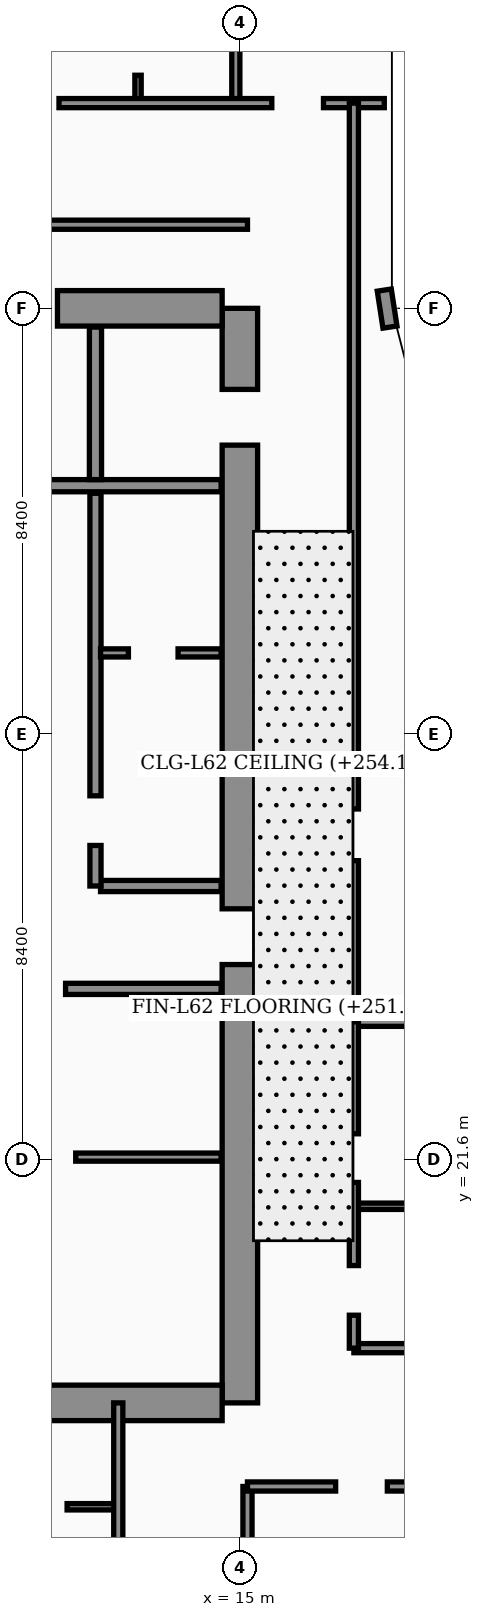
"""IFC4 building model, lengths in metres.
Left out: names, types, materials, properties, quantities, classifications, styles, units other than length and angle.
Written with IfcOpenShell. Run it as: python <this file> out.ifc"""

import sys

from ifc_helpers import new_model, si_unit, direction, frame, frame_2d, origin, place, context, subcontext, project, spatial, rectangle, extrude, element, fill, save


model = new_model("IFC4")
c1 = context("Model", 3, precision=1e-05, world=origin(), true_north=direction((0.0, 1.0)))
c2 = subcontext(c1, "Body", "Model", "MODEL_VIEW")
j1 = project(units=[si_unit("LENGTHUNIT", "METRE"), si_unit("PLANEANGLEUNIT", "RADIAN")], contexts=[c1])
p1 = place(None, origin())
s1 = spatial("IfcSite", under=j1, at=p1, CompositionType="ELEMENT")
p2 = place(p1, origin())
s2 = spatial("IfcBuilding", under=s1, at=p2, CompositionType="ELEMENT")
p3 = place(p2, frame((0.0, 0.0, 251.4)))
s3 = spatial("IfcBuildingStorey", under=s2, at=p3, CompositionType="ELEMENT", Elevation=251.4)
p4 = place(p3, frame((15.0, 16.8, 0.0), z_axis=(0.0, 0.0, 1.0), x_axis=(0.0, 1.0, 0.0)))
e1 = element("IfcWall", 1, at=p4, inside=s3, PredefinedType="SHEAR", context=c2, shape_type="SweptSolid", body=[
    extrude(rectangle(XDim=21.6, YDim=0.7, at=frame_2d((10.8, 0.0))), origin(), (0.0, 0.0, 1.0), 3.56),
])
p5 = place(p4, frame((8.65, 0.0, 0.0)))
e2 = element("IfcOpeningElement", 2, at=p5, cuts=e1, PredefinedType="OPENING", context=c2, shape_type="SweptSolid", body=[
    extrude(rectangle(XDim=1.1, YDim=2.2, at=frame_2d((0.55, 1.1))), frame((0.0, 0.36, 0.0), z_axis=(0.0, -1.0, 0.0), x_axis=(1.0, 0.0, 0.0)), (0.0, 0.0, 1.0), 0.72),
])
p6 = place(p4, frame((18.9, 0.0, 0.0)))
e3 = element("IfcOpeningElement", 3, at=p6, cuts=e1, PredefinedType="OPENING", context=c2, shape_type="SweptSolid", body=[
    extrude(rectangle(XDim=1.1, YDim=2.2, at=frame_2d((0.55, 1.1))), frame((0.0, 0.36, 0.0), z_axis=(0.0, -1.0, 0.0), x_axis=(1.0, 0.0, 0.0)), (0.0, 0.0, 1.0), 0.72),
])
p7 = place(p3, frame((4.55, 38.4, 0.0), z_axis=(0.0, 0.0, 1.0), x_axis=(1.0, 0.0, 0.0)))
e4 = element("IfcWall", 4, at=p7, inside=s3, PredefinedType="SHEAR", context=c2, shape_type="SweptSolid", body=[
    extrude(rectangle(XDim=10.1, YDim=0.7, at=frame_2d((5.05, 0.0))), origin(), (0.0, 0.0, 1.0), 3.56),
])
p8 = place(p7, frame((5.75, 0.0, 0.0)))
e5 = element("IfcOpeningElement", 5, at=p8, cuts=e4, PredefinedType="OPENING", context=c2, shape_type="SweptSolid", body=[
    extrude(rectangle(XDim=1.1, YDim=2.2, at=frame_2d((0.55, 1.1))), frame((0.0, 0.36, 0.0), z_axis=(0.0, -1.0, 0.0), x_axis=(1.0, 0.0, 0.0)), (0.0, 0.0, 1.0), 0.72),
])
p9 = place(p3, frame((4.55, 16.8, 0.0), z_axis=(0.0, 0.0, 1.0), x_axis=(1.0, 0.0, 0.0)))
e6 = element("IfcWall", 6, at=p9, inside=s3, PredefinedType="SHEAR", context=c2, shape_type="SweptSolid", body=[
    extrude(rectangle(XDim=10.1, YDim=0.7, at=frame_2d((5.05, 0.0))), origin(), (0.0, 0.0, 1.0), 3.56),
])
p10 = place(p3, frame((17.962, 38.03, 0.0), z_axis=(0.0, 0.0, 1.0), x_axis=(-0.15141125477, 0.988470855377, 0.0)))
e7 = element("IfcWall", 7, at=p10, inside=s3, PredefinedType="SOLIDWALL", context=c2, shape_type="SweptSolid", body=[
    extrude(rectangle(XDim=0.739, YDim=0.28, at=frame_2d((0.369, 0.0))), origin(), (0.0, 0.0, 1.0), 3.56),
])
p11 = place(p3, frame((9.68, 21.65, 0.0), z_axis=(0.0, 0.0, 1.0), x_axis=(1.0, 0.0, 0.0)))
e8 = element("IfcWall", 8, at=p11, inside=s3, PredefinedType="PARTITIONING", context=c2, shape_type="SweptSolid", body=[
    extrude(rectangle(XDim=4.95, YDim=0.16, at=frame_2d((2.475, 0.0))), origin(), (0.0, 0.0, 1.0), 3.09),
])
p12 = place(p11, frame((1.1, 0.0, 0.0)))
e9 = element("IfcOpeningElement", 9, at=p12, cuts=e8, PredefinedType="OPENING", context=c2, shape_type="SweptSolid", body=[
    extrude(rectangle(XDim=0.98, YDim=2.15, at=frame_2d((0.49, 1.075))), frame((0.0, 0.09, 0.0), z_axis=(0.0, -1.0, 0.0), x_axis=(1.0, 0.0, 0.0)), (0.0, 0.0, 1.0), 0.18),
])
p13 = place(p3, frame((9.68, 24.97, 0.0), z_axis=(0.0, 0.0, 1.0), x_axis=(1.0, 0.0, 0.0)))
e10 = element("IfcWall", 10, at=p13, inside=s3, PredefinedType="SOLIDWALL", context=c2, shape_type="SweptSolid", body=[
    extrude(rectangle(XDim=4.95, YDim=0.22, at=frame_2d((2.475, 0.0))), origin(), (0.0, 0.0, 1.0), 2.99),
])
p14 = place(p13, frame((0.9, 0.0, 0.0)))
e11 = element("IfcOpeningElement", 11, at=p14, cuts=e10, PredefinedType="OPENING", context=c2, shape_type="SweptSolid", body=[
    extrude(rectangle(XDim=0.98, YDim=2.15, at=frame_2d((0.49, 1.075))), frame((0.0, 0.12, 0.0), z_axis=(0.0, -1.0, 0.0), x_axis=(1.0, 0.0, 0.0)), (0.0, 0.0, 1.0), 0.24),
])
p15 = place(p3, frame((12.25, 27.0, 0.0), z_axis=(0.0, 0.0, 1.0), x_axis=(1.0, 0.0, 0.0)))
e12 = element("IfcWall", 12, at=p15, inside=s3, PredefinedType="SOLIDWALL", context=c2, shape_type="SweptSolid", body=[
    extrude(rectangle(XDim=2.38, YDim=0.22, at=frame_2d((1.19, 0.0))), origin(), (0.0, 0.0, 1.0), 3.56),
])
p16 = place(p3, frame((12.15, 27.0, 0.0), z_axis=(0.0, 0.0, 1.0), x_axis=(0.0, 1.0, 0.0)))
e13 = element("IfcWall", 13, at=p16, inside=s3, PredefinedType="SOLIDWALL", context=c2, shape_type="SweptSolid", body=[
    extrude(rectangle(XDim=7.75, YDim=0.22, at=frame_2d((3.875, 0.0))), origin(), (0.0, 0.0, 1.0), 3.56),
])
p17 = place(p16, frame((0.8, 0.0, 0.0)))
e14 = element("IfcOpeningElement", 14, at=p17, cuts=e13, PredefinedType="OPENING", context=c2, shape_type="SweptSolid", body=[
    extrude(rectangle(XDim=0.98, YDim=2.15, at=frame_2d((0.49, 1.075))), frame((0.0, 0.12, 0.0), z_axis=(0.0, -1.0, 0.0), x_axis=(1.0, 0.0, 0.0)), (0.0, 0.0, 1.0), 0.24),
])
p18 = place(p3, frame((12.25, 31.6, 0.0), z_axis=(0.0, 0.0, 1.0), x_axis=(1.0, 0.0, 0.0)))
e15 = element("IfcWall", 15, at=p18, inside=s3, PredefinedType="PARTITIONING", context=c2, shape_type="SweptSolid", body=[
    extrude(rectangle(XDim=2.38, YDim=0.16, at=frame_2d((1.19, 0.0))), origin(), (0.0, 0.0, 1.0), 3.14),
])
p19 = place(p18, frame((0.55, 0.0, 0.0)))
e16 = element("IfcOpeningElement", 16, at=p19, cuts=e15, PredefinedType="OPENING", context=c2, shape_type="SweptSolid", body=[
    extrude(rectangle(XDim=0.98, YDim=2.15, at=frame_2d((0.49, 1.075))), frame((0.0, 0.09, 0.0), z_axis=(0.0, -1.0, 0.0), x_axis=(1.0, 0.0, 0.0)), (0.0, 0.0, 1.0), 0.18),
])
p20 = place(p3, frame((9.66, 34.9, 0.0), z_axis=(0.0, 0.0, 1.0), x_axis=(1.0, 0.0, 0.0)))
e17 = element("IfcWall", 17, at=p20, inside=s3, PredefinedType="SOLIDWALL", context=c2, shape_type="SweptSolid", body=[
    extrude(rectangle(XDim=4.97, YDim=0.24, at=frame_2d((2.485, 0.0))), origin(), (0.0, 0.0, 1.0), 3.56),
])
p21 = place(p3, frame((12.15, 35.02, 0.0), z_axis=(0.0, 0.0, 1.0), x_axis=(0.0, 1.0, 0.0)))
e18 = element("IfcWall", 18, at=p21, inside=s3, PredefinedType="SOLIDWALL", context=c2, shape_type="SweptSolid", body=[
    extrude(rectangle(XDim=3.01, YDim=0.24, at=frame_2d((1.505, 0.0))), origin(), (0.0, 0.0, 1.0), 3.56),
])
p22 = place(p3, frame((0.08, 14.75, 0.0), z_axis=(0.0, 0.0, 1.0), x_axis=(1.0, 0.0, 0.0)))
e19 = element("IfcWall", 19, at=p22, inside=s3, PredefinedType="PARTITIONING", context=c2, shape_type="SweptSolid", body=[
    extrude(rectangle(XDim=12.52, YDim=0.125, at=frame_2d((6.26, 0.0))), origin(), (0.0, 0.0, 1.0), 2.99),
])
p23 = place(p22, frame((4.32, 0.0, 0.0)))
e20 = element("IfcOpeningElement", 20, at=p23, cuts=e19, PredefinedType="OPENING", context=c2, shape_type="SweptSolid", body=[
    extrude(rectangle(XDim=0.96, YDim=2.2, at=frame_2d((0.48, 1.1))), frame((0.0, 0.073, 0.0), z_axis=(0.0, -1.0, 0.0), x_axis=(1.0, 0.0, 0.0)), (0.0, 0.0, 1.0), 0.145),
])
p24 = place(p22, frame((10.61, 0.0, 0.0)))
e21 = element("IfcOpeningElement", 21, at=p24, cuts=e19, PredefinedType="OPENING", context=c2, shape_type="SweptSolid", body=[
    extrude(rectangle(XDim=0.9, YDim=2.15, at=frame_2d((0.45, 1.075))), frame((0.0, 0.073, 0.0), z_axis=(0.0, -1.0, 0.0), x_axis=(1.0, 0.0, 0.0)), (0.0, 0.0, 1.0), 0.145),
])
p25 = place(p3, frame((12.6, 2.44, 0.0), z_axis=(0.0, 0.0, 1.0), x_axis=(0.0, 1.0, 0.0)))
e22 = element("IfcWall", 22, at=p25, inside=s3, PredefinedType="PARTITIONING", context=c2, shape_type="SweptSolid", body=[
    extrude(rectangle(XDim=14.36, YDim=0.18, at=frame_2d((7.18, 0.0))), origin(), (0.0, 0.0, 1.0), 2.99),
])
p26 = place(p25, frame((3.01, 0.0, 0.0)))
e23 = element("IfcOpeningElement", 23, at=p26, cuts=e22, PredefinedType="OPENING", context=c2, shape_type="SweptSolid", body=[
    extrude(rectangle(XDim=1.02, YDim=2.2, at=frame_2d((0.51, 1.1))), frame((0.0, 0.1, 0.0), z_axis=(0.0, -1.0, 0.0), x_axis=(1.0, 0.0, 0.0)), (0.0, 0.0, 1.0), 0.2),
])
p27 = place(p25, frame((9.52, 0.0, 0.0)))
e24 = element("IfcOpeningElement", 24, at=p27, cuts=e22, PredefinedType="OPENING", context=c2, shape_type="SweptSolid", body=[
    extrude(rectangle(XDim=1.02, YDim=2.2, at=frame_2d((0.51, 1.1))), frame((0.0, 0.1, 0.0), z_axis=(0.0, -1.0, 0.0), x_axis=(1.0, 0.0, 0.0)), (0.0, 0.0, 1.0), 0.2),
])
p28 = place(p3, frame((15.15, 2.44, 0.0), z_axis=(0.0, 0.0, 1.0), x_axis=(0.0, 1.0, 0.0)))
e25 = element("IfcWall", 25, at=p28, inside=s3, PredefinedType="PARTITIONING", context=c2, shape_type="SweptSolid", body=[
    extrude(rectangle(XDim=12.71, YDim=0.18, at=frame_2d((6.355, 0.0))), origin(), (0.0, 0.0, 1.0), 3.09),
])
p29 = place(p3, frame((15.15, 15.15, 0.0), z_axis=(0.0, 0.0, 1.0), x_axis=(1.0, 0.0, 0.0)))
e26 = element("IfcWall", 26, at=p29, inside=s3, PredefinedType="PARTITIONING", context=c2, shape_type="SweptSolid", body=[
    extrude(rectangle(XDim=6.45, YDim=0.18, at=frame_2d((3.225, 0.0))), origin(), (0.0, 0.0, 1.0), 2.59),
])
p30 = place(p29, frame((1.74, 0.0, 0.0)))
e27 = element("IfcOpeningElement", 27, at=p30, cuts=e26, PredefinedType="OPENING", context=c2, shape_type="SweptSolid", body=[
    extrude(rectangle(XDim=1.02, YDim=2.2, at=frame_2d((0.51, 1.1))), frame((0.0, 0.1, 0.0), z_axis=(0.0, -1.0, 0.0), x_axis=(1.0, 0.0, 0.0)), (0.0, 0.0, 1.0), 0.2),
])
p31 = place(p3, frame((14.92, 42.45, 0.0), z_axis=(0.0, 0.0, 1.0), x_axis=(0.0, 1.0, 0.0)))
e28 = element("IfcWall", 28, at=p31, inside=s3, PredefinedType="PARTITIONING", context=c2, shape_type="SweptSolid", body=[
    extrude(rectangle(XDim=5.35, YDim=0.16, at=frame_2d((2.675, 0.0))), origin(), (0.0, 0.0, 1.0), 3.09),
])
p32 = place(p3, frame((12.99, 42.45, 0.0), z_axis=(0.0, 0.0, 1.0), x_axis=(0.0, 1.0, 0.0)))
e29 = element("IfcWall", 29, at=p32, inside=s3, PredefinedType="PARTITIONING", context=c2, shape_type="SweptSolid", body=[
    extrude(rectangle(XDim=8.49, YDim=0.125, at=frame_2d((4.245, 0.0))), origin(), (0.0, 0.0, 1.0), 3.09),
])
p33 = place(p32, frame((0.55, 0.0, 0.0)))
e30 = element("IfcOpeningElement", 30, at=p33, cuts=e29, PredefinedType="OPENING", context=c2, shape_type="SweptSolid", body=[
    extrude(rectangle(XDim=0.9, YDim=2.15, at=frame_2d((0.45, 1.075))), frame((0.0, 0.073, 0.0), z_axis=(0.0, -1.0, 0.0), x_axis=(1.0, 0.0, 0.0)), (0.0, 0.0, 1.0), 0.145),
])
p34 = place(p32, frame((4.72, 0.0, 0.0)))
e31 = element("IfcOpeningElement", 31, at=p34, cuts=e29, PredefinedType="OPENING", context=c2, shape_type="SweptSolid", body=[
    extrude(rectangle(XDim=0.96, YDim=2.2, at=frame_2d((0.48, 1.1))), frame((0.0, 0.073, 0.0), z_axis=(0.0, -1.0, 0.0), x_axis=(1.0, 0.0, 0.0)), (0.0, 0.0, 1.0), 0.145),
])
p35 = place(p3, frame((0.08, 42.45, 0.0), z_axis=(0.0, 0.0, 1.0), x_axis=(1.0, 0.0, 0.0)))
e32 = element("IfcWall", 32, at=p35, inside=s3, PredefinedType="PARTITIONING", context=c2, shape_type="SweptSolid", body=[
    extrude(rectangle(XDim=17.77, YDim=0.18, at=frame_2d((8.885, 0.0))), origin(), (0.0, 0.0, 1.0), 2.99),
])
p36 = place(p35, frame((0.9, 0.0, 0.0)))
e33 = element("IfcOpeningElement", 33, at=p36, cuts=e32, PredefinedType="OPENING", context=c2, shape_type="SweptSolid", body=[
    extrude(rectangle(XDim=1.02, YDim=2.2, at=frame_2d((0.51, 1.1))), frame((0.0, 0.1, 0.0), z_axis=(0.0, -1.0, 0.0), x_axis=(1.0, 0.0, 0.0)), (0.0, 0.0, 1.0), 0.2),
])
p37 = place(p35, frame((4.45, 0.0, 0.0)))
e34 = element("IfcOpeningElement", 34, at=p37, cuts=e32, PredefinedType="OPENING", context=c2, shape_type="SweptSolid", body=[
    extrude(rectangle(XDim=1.02, YDim=2.2, at=frame_2d((0.51, 1.1))), frame((0.0, 0.1, 0.0), z_axis=(0.0, -1.0, 0.0), x_axis=(1.0, 0.0, 0.0)), (0.0, 0.0, 1.0), 0.2),
])
p38 = place(p35, frame((10.33, 0.0, 0.0)))
e35 = element("IfcOpeningElement", 35, at=p38, cuts=e32, PredefinedType="OPENING", context=c2, shape_type="SweptSolid", body=[
    extrude(rectangle(XDim=1.02, YDim=2.2, at=frame_2d((0.51, 1.1))), frame((0.0, 0.1, 0.0), z_axis=(0.0, -1.0, 0.0), x_axis=(1.0, 0.0, 0.0)), (0.0, 0.0, 1.0), 0.2),
])
p39 = place(p35, frame((15.55, 0.0, 0.0)))
e36 = element("IfcOpeningElement", 36, at=p39, cuts=e32, PredefinedType="OPENING", context=c2, shape_type="SweptSolid", body=[
    extrude(rectangle(XDim=1.02, YDim=2.2, at=frame_2d((0.51, 1.1))), frame((0.0, 0.1, 0.0), z_axis=(0.0, -1.0, 0.0), x_axis=(1.0, 0.0, 0.0)), (0.0, 0.0, 1.0), 0.2),
])
p40 = place(p3, frame((17.25, 24.3, 0.0), z_axis=(0.0, 0.0, 1.0), x_axis=(0.0, 1.0, 0.0)))
e37 = element("IfcWall", 37, at=p40, inside=s3, PredefinedType="PARTITIONING", context=c2, shape_type="SweptSolid", body=[
    extrude(rectangle(XDim=18.15, YDim=0.18, at=frame_2d((9.075, 0.0))), origin(), (0.0, 0.0, 1.0), 2.99),
])
p41 = place(p40, frame((3.2, 0.0, 0.0)))
e38 = element("IfcOpeningElement", 38, at=p41, cuts=e37, PredefinedType="OPENING", context=c2, shape_type="SweptSolid", body=[
    extrude(rectangle(XDim=1.02, YDim=2.2, at=frame_2d((0.51, 1.1))), frame((0.0, 0.1, 0.0), z_axis=(0.0, -1.0, 0.0), x_axis=(1.0, 0.0, 0.0)), (0.0, 0.0, 1.0), 0.2),
])
p42 = place(p3, frame((3.83, 40.05, 0.0), z_axis=(0.0, 0.0, 1.0), x_axis=(1.0, 0.0, 0.0)))
e39 = element("IfcWall", 39, at=p42, inside=s3, PredefinedType="PARTITIONING", context=c2, shape_type="SweptSolid", body=[
    extrude(rectangle(XDim=11.32, YDim=0.18, at=frame_2d((5.66, 0.0))), origin(), (0.0, 0.0, 1.0), 2.99),
])
p43 = place(p3, frame((17.25, 17.88, 0.0), z_axis=(0.0, 0.0, 1.0), x_axis=(1.0, 0.0, 0.0)))
e40 = element("IfcWall", 40, at=p43, inside=s3, PredefinedType="PARTITIONING", context=c2, shape_type="SweptSolid", body=[
    extrude(rectangle(XDim=4.3, YDim=0.18, at=frame_2d((2.15, 0.0))), origin(), (0.0, 0.0, 1.0), 3.56),
])
p44 = place(p3, frame((17.25, 20.68, 0.0), z_axis=(0.0, 0.0, 1.0), x_axis=(1.0, 0.0, 0.0)))
e41 = element("IfcWall", 41, at=p44, inside=s3, PredefinedType="PARTITIONING", context=c2, shape_type="SweptSolid", body=[
    extrude(rectangle(XDim=4.3, YDim=0.125, at=frame_2d((2.15, 0.0))), origin(), (0.0, 0.0, 1.0), 3.56),
])
p45 = place(p3, frame((17.25, 24.32, 0.0), z_axis=(0.0, 0.0, 1.0), x_axis=(1.0, 0.0, 0.0)))
e42 = element("IfcWall", 42, at=p45, inside=s3, PredefinedType="PARTITIONING", context=c2, shape_type="SweptSolid", body=[
    extrude(rectangle(XDim=4.35, YDim=0.18, at=frame_2d((2.175, 0.0))), origin(), (0.0, 0.0, 1.0), 3.56),
])
p46 = place(p3, frame((17.25, 17.88, 0.0), z_axis=(0.0, 0.0, 1.0), x_axis=(0.0, 1.0, 0.0)))
e43 = element("IfcWall", 43, at=p46, inside=s3, PredefinedType="PARTITIONING", context=c2, shape_type="SweptSolid", body=[
    extrude(rectangle(XDim=6.44, YDim=0.18, at=frame_2d((3.22, 0.0))), origin(), (0.0, 0.0, 1.0), 3.09),
])
p47 = place(p46, frame((0.65, 0.0, 0.0)))
e44 = element("IfcOpeningElement", 44, at=p47, cuts=e43, PredefinedType="OPENING", context=c2, shape_type="SweptSolid", body=[
    extrude(rectangle(XDim=0.98, YDim=2.15, at=frame_2d((0.49, 1.075))), frame((0.0, 0.1, 0.0), z_axis=(0.0, -1.0, 0.0), x_axis=(1.0, 0.0, 0.0)), (0.0, 0.0, 1.0), 0.2),
])
p48 = place(p46, frame((3.27, 0.0, 0.0)))
e45 = element("IfcOpeningElement", 45, at=p48, cuts=e43, PredefinedType="OPENING", context=c2, shape_type="SweptSolid", body=[
    extrude(rectangle(XDim=0.96, YDim=2.2, at=frame_2d((0.48, 1.1))), frame((0.0, 0.1, 0.0), z_axis=(0.0, -1.0, 0.0), x_axis=(1.0, 0.0, 0.0)), (0.0, 0.0, 1.0), 0.2),
])
p49 = place(p12, origin())
e46 = element("IfcDoor", 46, at=p49, inside=s3, OperationType="SINGLE_SWING_LEFT", PredefinedType="DOOR", context=c2, shape_type="SweptSolid", body=[
    extrude(rectangle(XDim=0.98, YDim=2.15, at=frame_2d((0.49, 1.075))), frame((0.0, 0.025, 0.0), z_axis=(0.0, -1.0, 0.0), x_axis=(1.0, 0.0, 0.0)), (0.0, 0.0, 1.0), 0.05),
])
fill(e9, e46)
p50 = place(p14, origin())
e47 = element("IfcDoor", 47, at=p50, inside=s3, OperationType="SINGLE_SWING_RIGHT", PredefinedType="DOOR", context=c2, shape_type="SweptSolid", body=[
    extrude(rectangle(XDim=0.98, YDim=2.15, at=frame_2d((0.49, 1.075))), frame((0.0, 0.025, 0.0), z_axis=(0.0, -1.0, 0.0), x_axis=(1.0, 0.0, 0.0)), (0.0, 0.0, 1.0), 0.05),
])
fill(e11, e47)
p51 = place(p17, origin())
e48 = element("IfcDoor", 48, at=p51, inside=s3, OperationType="SINGLE_SWING_RIGHT", PredefinedType="DOOR", context=c2, shape_type="SweptSolid", body=[
    extrude(rectangle(XDim=0.98, YDim=2.15, at=frame_2d((0.49, 1.075))), frame((0.0, 0.025, 0.0), z_axis=(0.0, -1.0, 0.0), x_axis=(1.0, 0.0, 0.0)), (0.0, 0.0, 1.0), 0.05),
])
fill(e14, e48)
p52 = place(p19, origin())
e49 = element("IfcDoor", 49, at=p52, inside=s3, OperationType="SINGLE_SWING_LEFT", PredefinedType="DOOR", context=c2, shape_type="SweptSolid", body=[
    extrude(rectangle(XDim=0.98, YDim=2.15, at=frame_2d((0.49, 1.075))), frame((0.0, 0.025, 0.0), z_axis=(0.0, -1.0, 0.0), x_axis=(1.0, 0.0, 0.0)), (0.0, 0.0, 1.0), 0.05),
])
fill(e16, e49)
p53 = place(p24, origin())
e50 = element("IfcDoor", 50, at=p53, inside=s3, OperationType="SINGLE_SWING_RIGHT", PredefinedType="DOOR", context=c2, shape_type="SweptSolid", body=[
    extrude(rectangle(XDim=0.9, YDim=2.15, at=frame_2d((0.45, 1.075))), frame((0.0, 0.025, 0.0), z_axis=(0.0, -1.0, 0.0), x_axis=(1.0, 0.0, 0.0)), (0.0, 0.0, 1.0), 0.05),
])
fill(e21, e50)
p54 = place(p30, origin())
e51 = element("IfcDoor", 51, at=p54, inside=s3, OperationType="SINGLE_SWING_LEFT", PredefinedType="DOOR", context=c2, shape_type="SweptSolid", body=[
    extrude(rectangle(XDim=1.02, YDim=2.2, at=frame_2d((0.51, 1.1))), frame((0.0, 0.025, 0.0), z_axis=(0.0, -1.0, 0.0), x_axis=(1.0, 0.0, 0.0)), (0.0, 0.0, 1.0), 0.05),
])
fill(e27, e51)
p55 = place(p33, origin())
e52 = element("IfcDoor", 52, at=p55, inside=s3, OperationType="SINGLE_SWING_LEFT", PredefinedType="DOOR", context=c2, shape_type="SweptSolid", body=[
    extrude(rectangle(XDim=0.9, YDim=2.15, at=frame_2d((0.45, 1.075))), frame((0.0, 0.025, 0.0), z_axis=(0.0, -1.0, 0.0), x_axis=(1.0, 0.0, 0.0)), (0.0, 0.0, 1.0), 0.05),
])
fill(e30, e52)
p56 = place(p38, origin())
e53 = element("IfcDoor", 53, at=p56, inside=s3, OperationType="SINGLE_SWING_LEFT", PredefinedType="DOOR", context=c2, shape_type="SweptSolid", body=[
    extrude(rectangle(XDim=1.02, YDim=2.2, at=frame_2d((0.51, 1.1))), frame((0.0, 0.025, 0.0), z_axis=(0.0, -1.0, 0.0), x_axis=(1.0, 0.0, 0.0)), (0.0, 0.0, 1.0), 0.05),
])
fill(e35, e53)
p57 = place(p39, origin())
e54 = element("IfcDoor", 54, at=p57, inside=s3, OperationType="SINGLE_SWING_RIGHT", PredefinedType="DOOR", context=c2, shape_type="SweptSolid", body=[
    extrude(rectangle(XDim=1.02, YDim=2.2, at=frame_2d((0.51, 1.1))), frame((0.0, 0.025, 0.0), z_axis=(0.0, -1.0, 0.0), x_axis=(1.0, 0.0, 0.0)), (0.0, 0.0, 1.0), 0.05),
])
fill(e36, e54)
p58 = place(p41, origin())
e55 = element("IfcDoor", 55, at=p58, inside=s3, OperationType="SINGLE_SWING_RIGHT", PredefinedType="DOOR", context=c2, shape_type="SweptSolid", body=[
    extrude(rectangle(XDim=1.02, YDim=2.2, at=frame_2d((0.51, 1.1))), frame((0.0, 0.025, 0.0), z_axis=(0.0, -1.0, 0.0), x_axis=(1.0, 0.0, 0.0)), (0.0, 0.0, 1.0), 0.05),
])
fill(e38, e55)
p59 = place(p47, origin())
e56 = element("IfcDoor", 56, at=p59, inside=s3, OperationType="SINGLE_SWING_LEFT", PredefinedType="DOOR", context=c2, shape_type="SweptSolid", body=[
    extrude(rectangle(XDim=0.98, YDim=2.15, at=frame_2d((0.49, 1.075))), frame((0.0, 0.025, 0.0), z_axis=(0.0, -1.0, 0.0), x_axis=(1.0, 0.0, 0.0)), (0.0, 0.0, 1.0), 0.05),
])
fill(e44, e56)
p60 = place(p48, origin())
e57 = element("IfcDoor", 57, at=p60, inside=s3, OperationType="SINGLE_SWING_RIGHT", PredefinedType="DOOR", context=c2, shape_type="SweptSolid", body=[
    extrude(rectangle(XDim=0.96, YDim=2.2, at=frame_2d((0.48, 1.1))), frame((0.0, 0.025, 0.0), z_axis=(0.0, -1.0, 0.0), x_axis=(1.0, 0.0, 0.0)), (0.0, 0.0, 1.0), 0.05),
])
fill(e45, e57)
p61 = place(p5, origin())
e58 = element("IfcDoor", 58, at=p61, inside=s3, OperationType="SINGLE_SWING_LEFT", PredefinedType="DOOR", context=c2, shape_type="SweptSolid", body=[
    extrude(rectangle(XDim=1.1, YDim=2.2, at=frame_2d((0.55, 1.1))), frame((0.0, 0.025, 0.0), z_axis=(0.0, -1.0, 0.0), x_axis=(1.0, 0.0, 0.0)), (0.0, 0.0, 1.0), 0.05),
])
fill(e2, e58)
p62 = place(p6, origin())
e59 = element("IfcDoor", 59, at=p62, inside=s3, OperationType="DOUBLE_DOOR_SLIDING", PredefinedType="DOOR", context=c2, shape_type="SweptSolid", body=[
    extrude(rectangle(XDim=1.1, YDim=2.2, at=frame_2d((0.55, 1.1))), frame((0.0, 0.025, 0.0), z_axis=(0.0, -1.0, 0.0), x_axis=(1.0, 0.0, 0.0)), (0.0, 0.0, 1.0), 0.05),
])
fill(e3, e59)
p63 = place(p8, origin())
e60 = element("IfcDoor", 60, at=p63, inside=s3, OperationType="DOUBLE_DOOR_SLIDING", PredefinedType="DOOR", context=c2, shape_type="SweptSolid", body=[
    extrude(rectangle(XDim=1.1, YDim=2.2, at=frame_2d((0.55, 1.1))), frame((0.0, 0.025, 0.0), z_axis=(0.0, -1.0, 0.0), x_axis=(1.0, 0.0, 0.0)), (0.0, 0.0, 1.0), 0.05),
])
fill(e5, e60)
save(model, sys.argv[1])
